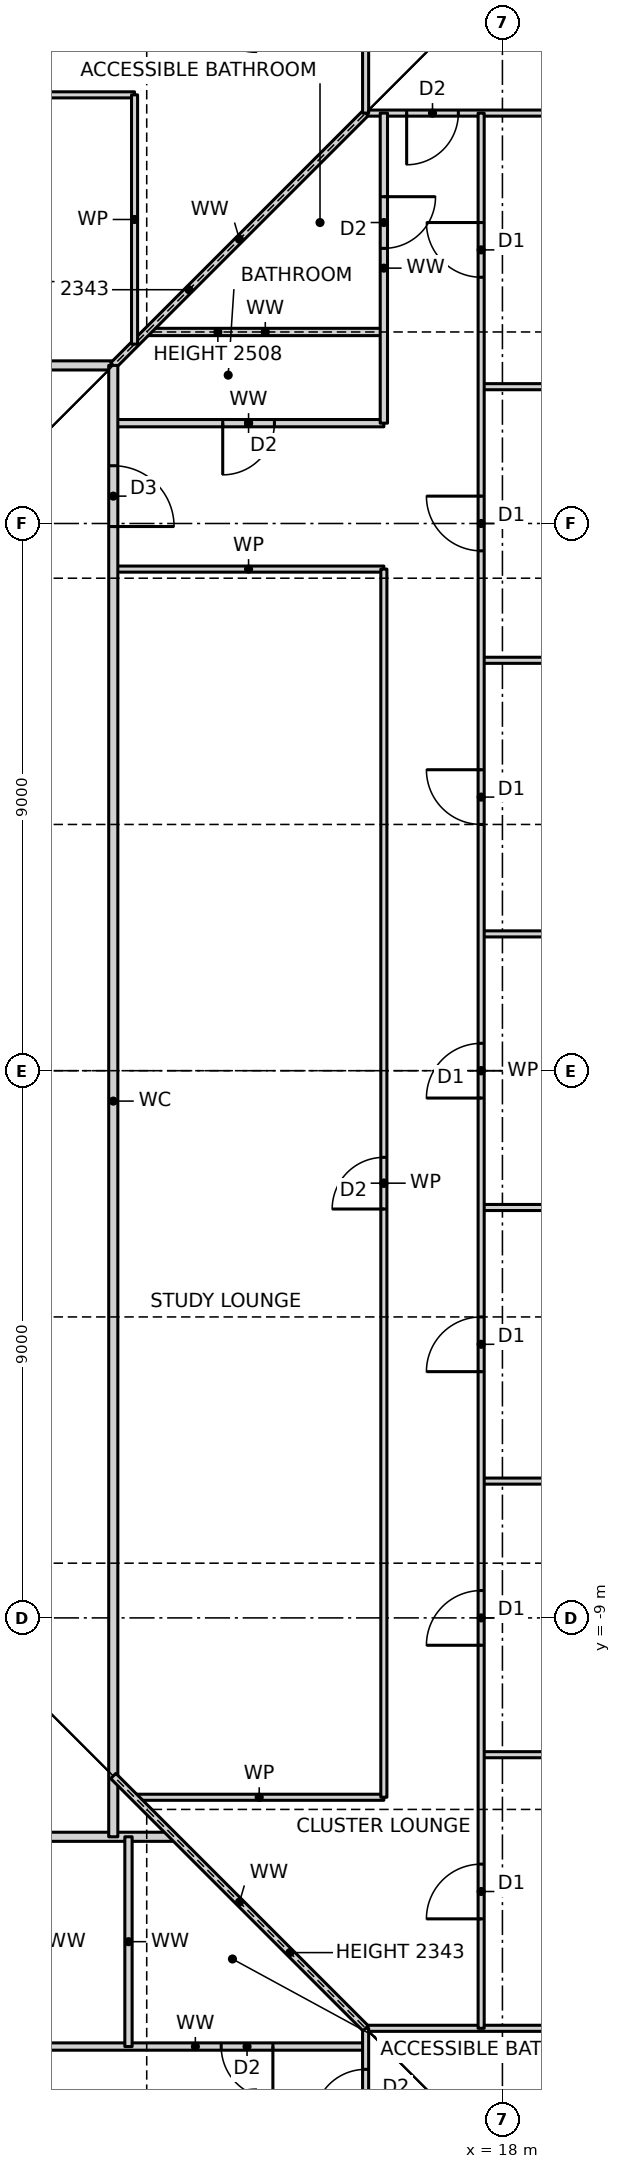
"""IFC4 building model, lengths in metres.
Left out: names, types, materials, properties, quantities, classifications, styles, units other than length and angle.
Written with IfcOpenShell. Run it as: python <this file> out.ifc"""

import sys

from ifc_helpers import new_model, si_unit, direction, frame, frame_2d, origin, place, context, subcontext, project, spatial, rectangle, extrude, element, fill, save


model = new_model("IFC4")
c1 = context("Model", 3, precision=1e-05, world=origin(), true_north=direction((0.0, 1.0)))
c2 = subcontext(c1, "Body", "Model", "MODEL_VIEW")
j1 = project(units=[si_unit("LENGTHUNIT", "METRE"), si_unit("PLANEANGLEUNIT", "RADIAN")], contexts=[c1])
p1 = place(None, origin())
s1 = spatial("IfcSite", under=j1, at=p1, CompositionType="ELEMENT")
p2 = place(p1, origin())
s2 = spatial("IfcBuilding", under=s1, at=p2, CompositionType="ELEMENT")
p3 = place(p2, frame((0.0, 0.0, 15.0)))
s3 = spatial("IfcBuildingStorey", under=s2, at=p3, CompositionType="ELEMENT", Elevation=15.0)
p4 = place(p3, frame((10.15, -16.05, 0.0), z_axis=(0.0, 0.0, 1.0), x_axis=(1.0, 0.0, 0.0)))
e1 = element("IfcWall", 1, at=p4, inside=s3, PredefinedType="PARTITIONING", context=c2, shape_type="SweptSolid", body=[
    extrude(rectangle(XDim=5.6, YDim=0.12, at=frame_2d((2.8, 0.0))), origin(), (0.0, 0.0, 1.0), 3.27),
])
p5 = place(p4, frame((3.225, 0.0, 0.0)))
e2 = element("IfcOpeningElement", 2, at=p5, cuts=e1, PredefinedType="OPENING", context=c2, shape_type="SweptSolid", body=[
    extrude(rectangle(XDim=0.85, YDim=2.1, at=frame_2d((0.425, 1.05))), frame((0.0, 0.07, 0.0), z_axis=(0.0, -1.0, 0.0), x_axis=(1.0, 0.0, 0.0)), (0.0, 0.0, 1.0), 0.14),
])
p6 = place(p3, frame((15.75, -15.75, 0.0), z_axis=(0.0, 0.0, 1.0), x_axis=(1.0, 0.0, 0.0)))
e3 = element("IfcWall", 3, at=p6, inside=s3, PredefinedType="PARTITIONING", context=c2, shape_type="SweptSolid", body=[
    extrude(rectangle(XDim=7.44, YDim=0.1, at=frame_2d((3.72, 0.0))), origin(), (0.0, 0.0, 1.0), 3.27),
])
p7 = place(p3, frame((-12.6, -12.6, 0.0), z_axis=(0.0, 0.0, 1.0), x_axis=(1.0, 0.0, 0.0)))
e4 = element("IfcWall", 4, at=p7, inside=s3, PredefinedType="PARTITIONING", context=c2, shape_type="SweptSolid", body=[
    extrude(rectangle(XDim=25.2, YDim=0.15, at=frame_2d((12.6, 0.0))), origin(), (0.0, 0.0, 1.0), 3.27),
])
p8 = place(p7, frame((21.05, 0.0, 0.0)))
e5 = element("IfcOpeningElement", 5, at=p8, cuts=e4, PredefinedType="OPENING", context=c2, shape_type="SweptSolid", body=[
    extrude(rectangle(XDim=1.0, YDim=2.1, at=frame_2d((0.5, 1.05))), frame((0.0, 0.085, 0.0), z_axis=(0.0, -1.0, 0.0), x_axis=(1.0, 0.0, 0.0)), (0.0, 0.0, 1.0), 0.17),
])
p9 = place(p3, frame((11.95, -11.95, 0.0), z_axis=(0.0, 0.0, 1.0), x_axis=(1.0, 0.0, 0.0)))
e6 = element("IfcWall", 6, at=p9, inside=s3, PredefinedType="PARTITIONING", context=c2, shape_type="SweptSolid", body=[
    extrude(rectangle(XDim=4.1, YDim=0.1, at=frame_2d((2.05, 0.0))), origin(), (0.0, 0.0, 1.0), 3.27),
])
for number, where, z_axis, x_axis in (
    (7, (17.65, -11.25, 0.0), (0.0, 0.0, 1.0), (1.0, 0.0, 0.0)),
    (8, (17.65, -6.75, 0.0), (0.0, 0.0, 1.0), (1.0, 0.0, 0.0)),
    (9, (17.65, -2.25, 0.0), (0.0, 0.0, 1.0), (1.0, 0.0, 0.0)),
    (10, (17.65, 2.25, 0.0), (0.0, 0.0, 1.0), (1.0, 0.0, 0.0)),
    (11, (17.65, 6.75, 0.0), (0.0, 0.0, 1.0), (1.0, 0.0, 0.0)),
):
    element("IfcWall", number, at=place(p3, frame(where, z_axis=z_axis, x_axis=x_axis)), inside=s3, PredefinedType="PARTITIONING", context=c2, shape_type="SweptSolid", body=[
        extrude(rectangle(XDim=5.54, YDim=0.1, at=frame_2d((2.77, 0.0))), origin(), (0.0, 0.0, 1.0), 3.27),
    ])
p10 = place(p3, frame((11.6, 8.25, 0.0), z_axis=(0.0, 0.0, 1.0), x_axis=(1.0, 0.0, 0.0)))
e12 = element("IfcWall", 12, at=p10, inside=s3, PredefinedType="PARTITIONING", context=c2, shape_type="SweptSolid", body=[
    extrude(rectangle(XDim=4.45, YDim=0.1, at=frame_2d((2.225, 0.0))), origin(), (0.0, 0.0, 1.0), 3.27),
])
p11 = place(p3, frame((11.6, 10.65, 0.0), z_axis=(0.0, 0.0, 1.0), x_axis=(1.0, 0.0, 0.0)))
e13 = element("IfcWall", 13, at=p11, inside=s3, PredefinedType="PARTITIONING", context=c2, shape_type="SweptSolid", body=[
    extrude(rectangle(XDim=4.45, YDim=0.12, at=frame_2d((2.225, 0.0))), origin(), (0.0, 0.0, 1.0), 3.27),
])
p12 = place(p11, frame((1.8, 0.0, 0.0)))
e14 = element("IfcOpeningElement", 14, at=p12, cuts=e13, PredefinedType="OPENING", context=c2, shape_type="SweptSolid", body=[
    extrude(rectangle(XDim=0.85, YDim=2.1, at=frame_2d((0.425, 1.05))), frame((0.0, 0.07, 0.0), z_axis=(0.0, -1.0, 0.0), x_axis=(1.0, 0.0, 0.0)), (0.0, 0.0, 1.0), 0.14),
])
p13 = place(p3, frame((17.65, 11.25, 0.0), z_axis=(0.0, 0.0, 1.0), x_axis=(1.0, 0.0, 0.0)))
e15 = element("IfcWall", 15, at=p13, inside=s3, PredefinedType="PARTITIONING", context=c2, shape_type="SweptSolid", body=[
    extrude(rectangle(XDim=5.54, YDim=0.1, at=frame_2d((2.77, 0.0))), origin(), (0.0, 0.0, 1.0), 3.27),
])
p14 = place(p3, frame((-11.6, 11.6, 0.0), z_axis=(0.0, 0.0, 1.0), x_axis=(1.0, 0.0, 0.0)))
e16 = element("IfcWall", 16, at=p14, inside=s3, PredefinedType="PARTITIONING", context=c2, shape_type="SweptSolid", body=[
    extrude(rectangle(XDim=23.2, YDim=0.15, at=frame_2d((11.6, 0.0))), origin(), (0.0, 0.0, 1.0), 3.27),
])
p15 = place(p14, frame((1.65, 0.0, 0.0)))
e17 = element("IfcOpeningElement", 17, at=p15, cuts=e16, PredefinedType="OPENING", context=c2, shape_type="SweptSolid", body=[
    extrude(rectangle(XDim=1.0, YDim=2.1, at=frame_2d((0.5, 1.05))), frame((0.0, 0.085, 0.0), z_axis=(0.0, -1.0, 0.0), x_axis=(1.0, 0.0, 0.0)), (0.0, 0.0, 1.0), 0.17),
])
p16 = place(p3, frame((12.15, 12.15, 0.0), z_axis=(0.0, 0.0, 1.0), x_axis=(1.0, 0.0, 0.0)))
e18 = element("IfcWall", 18, at=p16, inside=s3, PredefinedType="PARTITIONING", context=c2, shape_type="SweptSolid", body=[
    extrude(rectangle(XDim=3.9, YDim=0.12, at=frame_2d((1.95, 0.0))), origin(), (0.0, 0.0, 1.0), 2.508),
])
p17 = place(p3, frame((15.75, 15.75, 0.0), z_axis=(0.0, 0.0, 1.0), x_axis=(1.0, 0.0, 0.0)))
e19 = element("IfcWall", 19, at=p17, inside=s3, PredefinedType="PARTITIONING", context=c2, shape_type="SweptSolid", body=[
    extrude(rectangle(XDim=7.44, YDim=0.1, at=frame_2d((3.72, 0.0))), origin(), (0.0, 0.0, 1.0), 3.27),
])
p18 = place(p17, frame((0.675, 0.0, 0.0)))
e20 = element("IfcOpeningElement", 20, at=p18, cuts=e19, PredefinedType="OPENING", context=c2, shape_type="SweptSolid", body=[
    extrude(rectangle(XDim=0.85, YDim=2.1, at=frame_2d((0.425, 1.05))), frame((0.0, 0.06, 0.0), z_axis=(0.0, -1.0, 0.0), x_axis=(1.0, 0.0, 0.0)), (0.0, 0.0, 1.0), 0.12),
])
p19 = place(p3, frame((-8.25, 16.05, 0.0), z_axis=(0.0, 0.0, 1.0), x_axis=(1.0, 0.0, 0.0)))
e21 = element("IfcWall", 21, at=p19, inside=s3, PredefinedType="PARTITIONING", context=c2, shape_type="SweptSolid", body=[
    extrude(rectangle(XDim=20.2, YDim=0.1, at=frame_2d((10.1, 0.0))), origin(), (0.0, 0.0, 1.0), 3.27),
])
p20 = place(p19, frame((9.675, 0.0, 0.0)))
e22 = element("IfcOpeningElement", 22, at=p20, cuts=e21, PredefinedType="OPENING", context=c2, shape_type="SweptSolid", body=[
    extrude(rectangle(XDim=0.85, YDim=2.1, at=frame_2d((0.425, 1.05))), frame((0.0, 0.06, 0.0), z_axis=(0.0, -1.0, 0.0), x_axis=(1.0, 0.0, 0.0)), (0.0, 0.0, 1.0), 0.12),
])
p21 = place(p3, frame((11.6, 11.6, 0.0), z_axis=(0.0, 0.0, 1.0), x_axis=(0.707106781187, 0.707106781187, 0.0)))
e23 = element("IfcWall", 23, at=p21, inside=s3, PredefinedType="PARTITIONING", context=c2, shape_type="SweptSolid", body=[
    extrude(rectangle(XDim=5.869, YDim=0.12, at=frame_2d((2.935, 0.0))), origin(), (0.0, 0.0, 1.0), 2.343),
])
p22 = place(p3, frame((17.65, -15.75, 0.0), z_axis=(0.0, 0.0, 1.0), x_axis=(0.0, 1.0, 0.0)))
e24 = element("IfcWall", 24, at=p22, inside=s3, PredefinedType="PARTITIONING", context=c2, shape_type="SweptSolid", body=[
    extrude(rectangle(XDim=31.5, YDim=0.1, at=frame_2d((15.75, 0.0))), origin(), (0.0, 0.0, 1.0), 3.27),
])
p23 = place(p22, frame((1.8, 0.0, 0.0)))
e25 = element("IfcOpeningElement", 25, at=p23, cuts=e24, PredefinedType="OPENING", context=c2, shape_type="SweptSolid", body=[
    extrude(rectangle(XDim=0.9, YDim=2.1, at=frame_2d((0.45, 1.05))), frame((0.0, 0.06, 0.0), z_axis=(0.0, -1.0, 0.0), x_axis=(1.0, 0.0, 0.0)), (0.0, 0.0, 1.0), 0.12),
])
p24 = place(p22, frame((6.3, 0.0, 0.0)))
e26 = element("IfcOpeningElement", 26, at=p24, cuts=e24, PredefinedType="OPENING", context=c2, shape_type="SweptSolid", body=[
    extrude(rectangle(XDim=0.9, YDim=2.1, at=frame_2d((0.45, 1.05))), frame((0.0, 0.06, 0.0), z_axis=(0.0, -1.0, 0.0), x_axis=(1.0, 0.0, 0.0)), (0.0, 0.0, 1.0), 0.12),
])
p25 = place(p22, frame((10.8, 0.0, 0.0)))
e27 = element("IfcOpeningElement", 27, at=p25, cuts=e24, PredefinedType="OPENING", context=c2, shape_type="SweptSolid", body=[
    extrude(rectangle(XDim=0.9, YDim=2.1, at=frame_2d((0.45, 1.05))), frame((0.0, 0.06, 0.0), z_axis=(0.0, -1.0, 0.0), x_axis=(1.0, 0.0, 0.0)), (0.0, 0.0, 1.0), 0.12),
])
p26 = place(p22, frame((15.3, 0.0, 0.0)))
e28 = element("IfcOpeningElement", 28, at=p26, cuts=e24, PredefinedType="OPENING", context=c2, shape_type="SweptSolid", body=[
    extrude(rectangle(XDim=0.9, YDim=2.1, at=frame_2d((0.45, 1.05))), frame((0.0, 0.06, 0.0), z_axis=(0.0, -1.0, 0.0), x_axis=(1.0, 0.0, 0.0)), (0.0, 0.0, 1.0), 0.12),
])
p27 = place(p22, frame((19.8, 0.0, 0.0)))
e29 = element("IfcOpeningElement", 29, at=p27, cuts=e24, PredefinedType="OPENING", context=c2, shape_type="SweptSolid", body=[
    extrude(rectangle(XDim=0.9, YDim=2.1, at=frame_2d((0.45, 1.05))), frame((0.0, 0.06, 0.0), z_axis=(0.0, -1.0, 0.0), x_axis=(1.0, 0.0, 0.0)), (0.0, 0.0, 1.0), 0.12),
])
p28 = place(p22, frame((24.3, 0.0, 0.0)))
e30 = element("IfcOpeningElement", 30, at=p28, cuts=e24, PredefinedType="OPENING", context=c2, shape_type="SweptSolid", body=[
    extrude(rectangle(XDim=0.9, YDim=2.1, at=frame_2d((0.45, 1.05))), frame((0.0, 0.06, 0.0), z_axis=(0.0, -1.0, 0.0), x_axis=(1.0, 0.0, 0.0)), (0.0, 0.0, 1.0), 0.12),
])
p29 = place(p22, frame((28.8, 0.0, 0.0)))
e31 = element("IfcOpeningElement", 31, at=p29, cuts=e24, PredefinedType="OPENING", context=c2, shape_type="SweptSolid", body=[
    extrude(rectangle(XDim=0.9, YDim=2.1, at=frame_2d((0.45, 1.05))), frame((0.0, 0.06, 0.0), z_axis=(0.0, -1.0, 0.0), x_axis=(1.0, 0.0, 0.0)), (0.0, 0.0, 1.0), 0.12),
])
p30 = place(p3, frame((16.05, -11.95, 0.0), z_axis=(0.0, 0.0, 1.0), x_axis=(0.0, 1.0, 0.0)))
e32 = element("IfcWall", 32, at=p30, inside=s3, PredefinedType="PARTITIONING", context=c2, shape_type="SweptSolid", body=[
    extrude(rectangle(XDim=20.2, YDim=0.1, at=frame_2d((10.1, 0.0))), origin(), (0.0, 0.0, 1.0), 3.27),
])
p31 = place(p30, frame((9.675, 0.0, 0.0)))
e33 = element("IfcOpeningElement", 33, at=p31, cuts=e32, PredefinedType="OPENING", context=c2, shape_type="SweptSolid", body=[
    extrude(rectangle(XDim=0.85, YDim=2.1, at=frame_2d((0.425, 1.05))), frame((0.0, 0.06, 0.0), z_axis=(0.0, -1.0, 0.0), x_axis=(1.0, 0.0, 0.0)), (0.0, 0.0, 1.0), 0.12),
])
p32 = place(p3, frame((16.05, 10.65, 0.0), z_axis=(0.0, 0.0, 1.0), x_axis=(0.0, 1.0, 0.0)))
e34 = element("IfcWall", 34, at=p32, inside=s3, PredefinedType="PARTITIONING", context=c2, shape_type="SweptSolid", body=[
    extrude(rectangle(XDim=5.1, YDim=0.12, at=frame_2d((2.55, 0.0))), origin(), (0.0, 0.0, 1.0), 3.27),
])
p33 = place(p32, frame((2.875, 0.0, 0.0)))
e35 = element("IfcOpeningElement", 35, at=p33, cuts=e34, PredefinedType="OPENING", context=c2, shape_type="SweptSolid", body=[
    extrude(rectangle(XDim=0.85, YDim=2.1, at=frame_2d((0.425, 1.05))), frame((0.0, 0.07, 0.0), z_axis=(0.0, -1.0, 0.0), x_axis=(1.0, 0.0, 0.0)), (0.0, 0.0, 1.0), 0.14),
])
p34 = place(p3, frame((15.75, -23.19, 0.0), z_axis=(0.0, 0.0, 1.0), x_axis=(0.0, 1.0, 0.0)))
e36 = element("IfcWall", 36, at=p34, inside=s3, PredefinedType="PARTITIONING", context=c2, shape_type="SweptSolid", body=[
    extrude(rectangle(XDim=7.44, YDim=0.1, at=frame_2d((3.72, 0.0))), origin(), (0.0, 0.0, 1.0), 3.27),
])
p35 = place(p34, frame((5.915, 0.0, 0.0)))
e37 = element("IfcOpeningElement", 37, at=p35, cuts=e36, PredefinedType="OPENING", context=c2, shape_type="SweptSolid", body=[
    extrude(rectangle(XDim=0.85, YDim=2.1, at=frame_2d((0.425, 1.05))), frame((0.0, 0.06, 0.0), z_axis=(0.0, -1.0, 0.0), x_axis=(1.0, 0.0, 0.0)), (0.0, 0.0, 1.0), 0.12),
])
p36 = place(p3, frame((15.75, 15.75, 0.0), z_axis=(0.0, 0.0, 1.0), x_axis=(0.0, 1.0, 0.0)))
e38 = element("IfcWall", 38, at=p36, inside=s3, PredefinedType="PARTITIONING", context=c2, shape_type="SweptSolid", body=[
    extrude(rectangle(XDim=7.44, YDim=0.1, at=frame_2d((3.72, 0.0))), origin(), (0.0, 0.0, 1.0), 3.27),
])
p37 = place(p3, frame((11.95, 11.95, 0.0), z_axis=(0.0, 0.0, 1.0), x_axis=(0.0, 1.0, 0.0)))
e39 = element("IfcWall", 39, at=p37, inside=s3, PredefinedType="PARTITIONING", context=c2, shape_type="SweptSolid", body=[
    extrude(rectangle(XDim=4.1, YDim=0.1, at=frame_2d((2.05, 0.0))), origin(), (0.0, 0.0, 1.0), 3.27),
])
p38 = place(p3, frame((11.85, -16.05, 0.0), z_axis=(0.0, 0.0, 1.0), x_axis=(0.0, 1.0, 0.0)))
e40 = element("IfcWall", 40, at=p38, inside=s3, PredefinedType="PARTITIONING", context=c2, shape_type="SweptSolid", body=[
    extrude(rectangle(XDim=3.45, YDim=0.12, at=frame_2d((1.725, 0.0))), origin(), (0.0, 0.0, 1.0), 3.27),
])
p39 = place(p3, frame((11.6, -12.6, 0.0), z_axis=(0.0, 0.0, 1.0), x_axis=(0.0, 1.0, 0.0)))
e41 = element("IfcWall", 41, at=p39, inside=s3, PredefinedType="PARTITIONING", context=c2, shape_type="SweptSolid", body=[
    extrude(rectangle(XDim=24.2, YDim=0.15, at=frame_2d((12.1, 0.0))), origin(), (0.0, 0.0, 1.0), 3.27),
])
p40 = place(p39, frame((21.55, 0.0, 0.0)))
e42 = element("IfcOpeningElement", 42, at=p40, cuts=e41, PredefinedType="OPENING", context=c2, shape_type="SweptSolid", body=[
    extrude(rectangle(XDim=1.0, YDim=2.1, at=frame_2d((0.5, 1.05))), frame((0.0, 0.085, 0.0), z_axis=(0.0, -1.0, 0.0), x_axis=(1.0, 0.0, 0.0)), (0.0, 0.0, 1.0), 0.17),
])
p41 = place(p3, frame((15.75, -15.75, 0.0), z_axis=(0.0, 0.0, 1.0), x_axis=(-0.707106781187, 0.707106781187, 0.0)))
e43 = element("IfcWall", 43, at=p41, inside=s3, PredefinedType="PARTITIONING", context=c2, shape_type="SweptSolid", body=[
    extrude(rectangle(XDim=5.869, YDim=0.12, at=frame_2d((2.935, 0.0))), origin(), (0.0, 0.0, 1.0), 2.343),
])
p42 = place(p5, frame((0.85, 0.0, 0.0), z_axis=(0.0, 0.0, 1.0), x_axis=(-1.0, 0.0, 0.0)))
e44 = element("IfcDoor", 44, at=p42, inside=s3, OperationType="SINGLE_SWING_LEFT", PredefinedType="DOOR", context=c2, shape_type="SweptSolid", body=[
    extrude(rectangle(XDim=0.85, YDim=2.1, at=frame_2d((0.425, 1.05))), frame((0.0, 0.025, 0.0), z_axis=(0.0, -1.0, 0.0), x_axis=(1.0, 0.0, 0.0)), (0.0, 0.0, 1.0), 0.05),
])
fill(e2, e44)
p43 = place(p23, origin())
e45 = element("IfcDoor", 45, at=p43, inside=s3, OperationType="SINGLE_SWING_LEFT", PredefinedType="DOOR", context=c2, shape_type="SweptSolid", body=[
    extrude(rectangle(XDim=0.9, YDim=2.1, at=frame_2d((0.45, 1.05))), frame((0.0, 0.025, 0.0), z_axis=(0.0, -1.0, 0.0), x_axis=(1.0, 0.0, 0.0)), (0.0, 0.0, 1.0), 0.05),
])
fill(e25, e45)
p44 = place(p24, origin())
e46 = element("IfcDoor", 46, at=p44, inside=s3, OperationType="SINGLE_SWING_LEFT", PredefinedType="DOOR", context=c2, shape_type="SweptSolid", body=[
    extrude(rectangle(XDim=0.9, YDim=2.1, at=frame_2d((0.45, 1.05))), frame((0.0, 0.025, 0.0), z_axis=(0.0, -1.0, 0.0), x_axis=(1.0, 0.0, 0.0)), (0.0, 0.0, 1.0), 0.05),
])
fill(e26, e46)
p45 = place(p25, origin())
e47 = element("IfcDoor", 47, at=p45, inside=s3, OperationType="SINGLE_SWING_LEFT", PredefinedType="DOOR", context=c2, shape_type="SweptSolid", body=[
    extrude(rectangle(XDim=0.9, YDim=2.1, at=frame_2d((0.45, 1.05))), frame((0.0, 0.025, 0.0), z_axis=(0.0, -1.0, 0.0), x_axis=(1.0, 0.0, 0.0)), (0.0, 0.0, 1.0), 0.05),
])
fill(e27, e47)
p46 = place(p26, origin())
e48 = element("IfcDoor", 48, at=p46, inside=s3, OperationType="SINGLE_SWING_LEFT", PredefinedType="DOOR", context=c2, shape_type="SweptSolid", body=[
    extrude(rectangle(XDim=0.9, YDim=2.1, at=frame_2d((0.45, 1.05))), frame((0.0, 0.025, 0.0), z_axis=(0.0, -1.0, 0.0), x_axis=(1.0, 0.0, 0.0)), (0.0, 0.0, 1.0), 0.05),
])
fill(e28, e48)
p47 = place(p27, origin())
e49 = element("IfcDoor", 49, at=p47, inside=s3, OperationType="SINGLE_SWING_RIGHT", PredefinedType="DOOR", context=c2, shape_type="SweptSolid", body=[
    extrude(rectangle(XDim=0.9, YDim=2.1, at=frame_2d((0.45, 1.05))), frame((0.0, 0.025, 0.0), z_axis=(0.0, -1.0, 0.0), x_axis=(1.0, 0.0, 0.0)), (0.0, 0.0, 1.0), 0.05),
])
fill(e29, e49)
p48 = place(p28, origin())
e50 = element("IfcDoor", 50, at=p48, inside=s3, OperationType="SINGLE_SWING_RIGHT", PredefinedType="DOOR", context=c2, shape_type="SweptSolid", body=[
    extrude(rectangle(XDim=0.9, YDim=2.1, at=frame_2d((0.45, 1.05))), frame((0.0, 0.025, 0.0), z_axis=(0.0, -1.0, 0.0), x_axis=(1.0, 0.0, 0.0)), (0.0, 0.0, 1.0), 0.05),
])
fill(e30, e50)
p49 = place(p29, origin())
e51 = element("IfcDoor", 51, at=p49, inside=s3, OperationType="SINGLE_SWING_RIGHT", PredefinedType="DOOR", context=c2, shape_type="SweptSolid", body=[
    extrude(rectangle(XDim=0.9, YDim=2.1, at=frame_2d((0.45, 1.05))), frame((0.0, 0.025, 0.0), z_axis=(0.0, -1.0, 0.0), x_axis=(1.0, 0.0, 0.0)), (0.0, 0.0, 1.0), 0.05),
])
fill(e31, e51)
p50 = place(p40, frame((1.0, 0.0, 0.0), z_axis=(0.0, 0.0, 1.0), x_axis=(-1.0, 0.0, 0.0)))
e52 = element("IfcDoor", 52, at=p50, inside=s3, OperationType="SINGLE_SWING_RIGHT", PredefinedType="DOOR", context=c2, shape_type="SweptSolid", body=[
    extrude(rectangle(XDim=1.0, YDim=2.1, at=frame_2d((0.5, 1.05))), frame((0.0, 0.025, 0.0), z_axis=(0.0, -1.0, 0.0), x_axis=(1.0, 0.0, 0.0)), (0.0, 0.0, 1.0), 0.05),
])
fill(e42, e52)
p51 = place(p31, origin())
e53 = element("IfcDoor", 53, at=p51, inside=s3, OperationType="SINGLE_SWING_LEFT", PredefinedType="DOOR", context=c2, shape_type="SweptSolid", body=[
    extrude(rectangle(XDim=0.85, YDim=2.1, at=frame_2d((0.425, 1.05))), frame((0.0, 0.025, 0.0), z_axis=(0.0, -1.0, 0.0), x_axis=(1.0, 0.0, 0.0)), (0.0, 0.0, 1.0), 0.05),
])
fill(e33, e53)
p52 = place(p12, frame((0.85, 0.0, 0.0), z_axis=(0.0, 0.0, 1.0), x_axis=(-1.0, 0.0, 0.0)))
e54 = element("IfcDoor", 54, at=p52, inside=s3, OperationType="SINGLE_SWING_RIGHT", PredefinedType="DOOR", context=c2, shape_type="SweptSolid", body=[
    extrude(rectangle(XDim=0.85, YDim=2.1, at=frame_2d((0.425, 1.05))), frame((0.0, 0.025, 0.0), z_axis=(0.0, -1.0, 0.0), x_axis=(1.0, 0.0, 0.0)), (0.0, 0.0, 1.0), 0.05),
])
fill(e14, e54)
p53 = place(p33, frame((0.85, 0.0, 0.0), z_axis=(0.0, 0.0, 1.0), x_axis=(-1.0, 0.0, 0.0)))
e55 = element("IfcDoor", 55, at=p53, inside=s3, OperationType="SINGLE_SWING_LEFT", PredefinedType="DOOR", context=c2, shape_type="SweptSolid", body=[
    extrude(rectangle(XDim=0.85, YDim=2.1, at=frame_2d((0.425, 1.05))), frame((0.0, 0.025, 0.0), z_axis=(0.0, -1.0, 0.0), x_axis=(1.0, 0.0, 0.0)), (0.0, 0.0, 1.0), 0.05),
])
fill(e35, e55)
p54 = place(p35, origin())
e56 = element("IfcDoor", 56, at=p54, inside=s3, OperationType="SINGLE_SWING_LEFT", PredefinedType="DOOR", context=c2, shape_type="SweptSolid", body=[
    extrude(rectangle(XDim=0.85, YDim=2.1, at=frame_2d((0.425, 1.05))), frame((0.0, 0.025, 0.0), z_axis=(0.0, -1.0, 0.0), x_axis=(1.0, 0.0, 0.0)), (0.0, 0.0, 1.0), 0.05),
])
fill(e37, e56)
p55 = place(p18, frame((0.85, 0.0, 0.0), z_axis=(0.0, 0.0, 1.0), x_axis=(-1.0, 0.0, 0.0)))
e57 = element("IfcDoor", 57, at=p55, inside=s3, OperationType="SINGLE_SWING_RIGHT", PredefinedType="DOOR", context=c2, shape_type="SweptSolid", body=[
    extrude(rectangle(XDim=0.85, YDim=2.1, at=frame_2d((0.425, 1.05))), frame((0.0, 0.025, 0.0), z_axis=(0.0, -1.0, 0.0), x_axis=(1.0, 0.0, 0.0)), (0.0, 0.0, 1.0), 0.05),
])
fill(e20, e57)
save(model, sys.argv[1])
